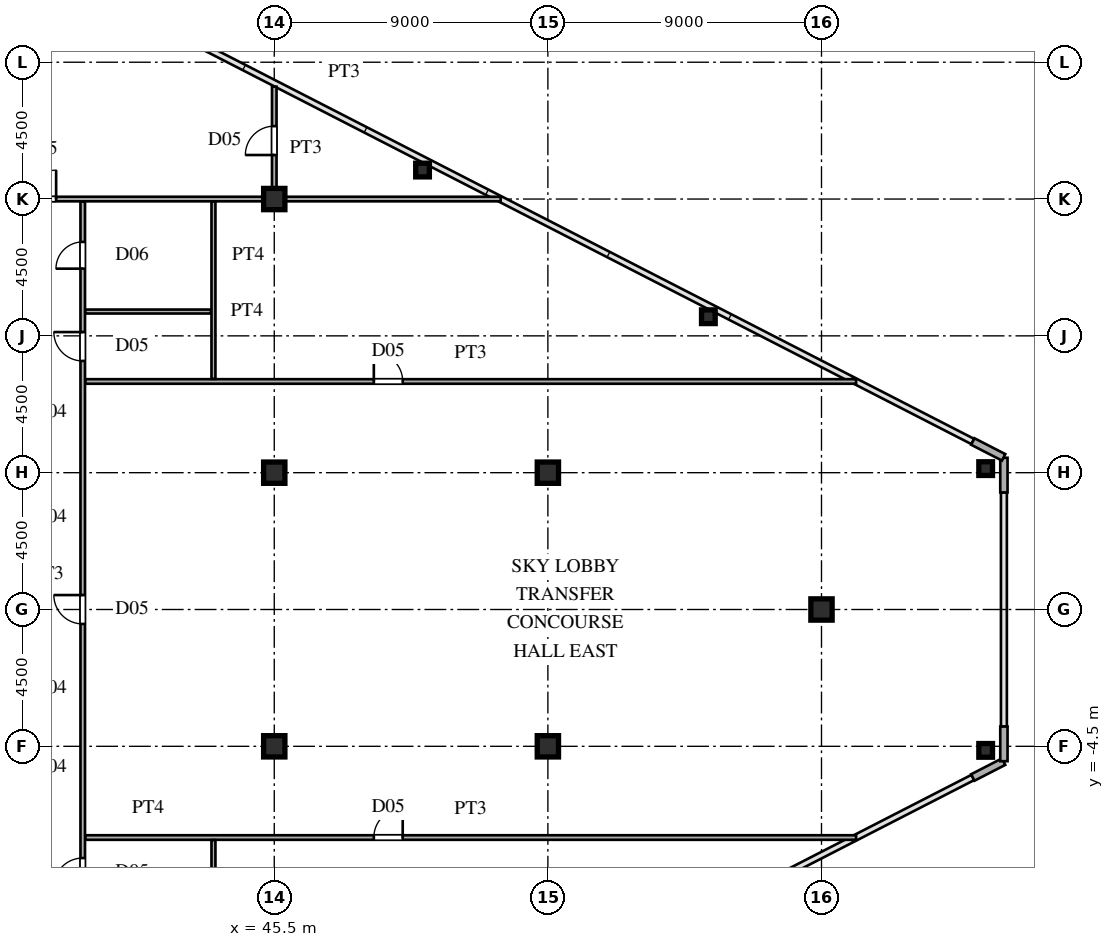
"""IFC4 building model, lengths in metres.
Left out: names, types, materials, properties, quantities, classifications, styles, units other than length and angle.
Written with IfcOpenShell. Run it as: python <this file> out.ifc"""

import sys

from ifc_helpers import new_model, si_unit, direction, frame, frame_2d, origin, origin_2d, place, context, subcontext, project, spatial, rectangle, hollow_rectangle, i_section, extrude, source, transform, mapped, element, fill, save


model = new_model("IFC4")
c1 = context("Model", 3, precision=1e-05, world=origin(), true_north=direction((0.0, 1.0)))
c2 = subcontext(c1, "Body", "Model", "MODEL_VIEW")
j1 = project(units=[si_unit("LENGTHUNIT", "METRE"), si_unit("PLANEANGLEUNIT", "RADIAN")], contexts=[c1])
p1 = place(None, origin())
s1 = spatial("IfcSite", under=j1, at=p1, CompositionType="ELEMENT")
p2 = place(p1, origin())
s2 = spatial("IfcBuilding", under=s1, at=p2, CompositionType="ELEMENT")
p3 = place(p2, frame((0.0, 0.0, 135.6)))
s3 = spatial("IfcBuildingStorey", under=s2, at=p3, CompositionType="ELEMENT", Elevation=135.6)
m1 = source(origin(), c2, "Body", "SweptSolid", [
    extrude(i_section(OverallWidth=0.7, OverallDepth=0.7, WebThickness=0.028, FlangeThickness=0.045, at=origin_2d()), origin(), (0.0, 0.0, 1.0), 4.8),
])
for number, where, z_axis, x_axis in (
    (1, (45.5, -4.5, 0.0), (0.0, 0.0, 1.0), (1.0, 0.0, 0.0)),
    (2, (45.5, 4.5, 0.0), (0.0, 0.0, 1.0), (1.0, 0.0, 0.0)),
    (3, (45.5, 13.5, 0.0), (0.0, 0.0, 1.0), (1.0, 0.0, 0.0)),
    (4, (54.5, -4.5, 0.0), (0.0, 0.0, 1.0), (1.0, 0.0, 0.0)),
    (5, (54.5, 4.5, 0.0), (0.0, 0.0, 1.0), (1.0, 0.0, 0.0)),
    (6, (63.5, 0.0, 0.0), (0.0, 0.0, 1.0), (1.0, 0.0, 0.0)),
):
    element("IfcColumn", number, at=place(p3, frame(where, z_axis=z_axis, x_axis=x_axis)), inside=s3, PredefinedType="COLUMN", context=c2, shape_type="MappedRepresentation", body=[
        mapped(m1, transform((0.0, 0.0, 0.0), scale=1.0)),
    ])
m2 = source(origin(), c2, "Body", "SweptSolid", [
    extrude(hollow_rectangle(XDim=0.45, YDim=0.45, WallThickness=0.018, at=origin_2d()), origin(), (0.0, 0.0, 1.0), 4.8),
])
for number, where, z_axis, x_axis in (
    (7, (68.9, -4.634, 0.0), (0.0, 0.0, 1.0), (1.0, 0.0, 0.0)),
    (8, (68.9, 4.634, 0.0), (0.0, 0.0, 1.0), (1.0, 0.0, 0.0)),
    (9, (50.377, 14.453, 0.0), (0.0, 0.0, 1.0), (1.0, 0.0, 0.0)),
    (10, (59.779, 9.629, 0.0), (0.0, 0.0, 1.0), (1.0, 0.0, 0.0)),
):
    element("IfcColumn", number, at=place(p3, frame(where, z_axis=z_axis, x_axis=x_axis)), inside=s3, PredefinedType="COLUMN", context=c2, shape_type="MappedRepresentation", body=[
        mapped(m2, transform((0.0, 0.0, 0.0), scale=1.0)),
    ])
p4 = place(p3, frame((68.477, -5.525, 0.0), z_axis=(0.0, 0.0, 1.0), x_axis=(0.889797395748, 0.456355776255, 0.0)))
e11 = element("IfcWall", 11, at=p4, inside=s3, PredefinedType="SOLIDWALL", context=c2, shape_type="SweptSolid", body=[
    extrude(rectangle(XDim=1.14, YDim=0.24, at=frame_2d((0.57, 0.0))), origin(), (0.0, 0.0, 1.0), 4.58),
])
for number, where, z_axis, x_axis in (
    (12, (69.5, -4.99, 0.0), (0.0, 0.0, 1.0), (0.0, 1.0, 0.0)),
    (13, (69.5, 3.85, 0.0), (0.0, 0.0, 1.0), (0.0, 1.0, 0.0)),
):
    element("IfcWall", number, at=place(p3, frame(where, z_axis=z_axis, x_axis=x_axis)), inside=s3, PredefinedType="SOLIDWALL", context=c2, shape_type="SweptSolid", body=[
        extrude(rectangle(XDim=1.14, YDim=0.24, at=frame_2d((0.57, 0.0))), origin(), (0.0, 0.0, 1.0), 4.58),
    ])
p5 = place(p3, frame((69.491, 5.005, 0.0), z_axis=(0.0, 0.0, 1.0), x_axis=(-0.889797395748, 0.456355776255, 0.0)))
e14 = element("IfcWall", 14, at=p5, inside=s3, PredefinedType="SOLIDWALL", context=c2, shape_type="SweptSolid", body=[
    extrude(rectangle(XDim=1.14, YDim=0.24, at=frame_2d((0.57, 0.0))), origin(), (0.0, 0.0, 1.0), 4.58),
])
p6 = place(p3, frame((39.285, -7.5, 0.0), z_axis=(0.0, 0.0, 1.0), x_axis=(1.0, 0.0, 0.0)))
e15 = element("IfcWall", 15, at=p6, inside=s3, PredefinedType="PARTITIONING", context=c2, shape_type="SweptSolid", body=[
    extrude(rectangle(XDim=25.354, YDim=0.15, at=frame_2d((12.677, 0.0))), origin(), (0.0, 0.0, 1.0), 4.58),
])
p7 = place(p6, frame((9.49, 0.0, 0.0)))
e16 = element("IfcOpeningElement", 16, at=p7, cuts=e15, PredefinedType="OPENING", context=c2, shape_type="SweptSolid", body=[
    extrude(rectangle(XDim=0.95, YDim=2.15, at=frame_2d((0.475, 1.075))), frame((0.0, 0.085, 0.0), z_axis=(0.0, -1.0, 0.0), x_axis=(1.0, 0.0, 0.0)), (0.0, 0.0, 1.0), 0.17),
])
p8 = place(p3, frame((39.285, 7.5, 0.0), z_axis=(0.0, 0.0, 1.0), x_axis=(1.0, 0.0, 0.0)))
e17 = element("IfcWall", 17, at=p8, inside=s3, PredefinedType="PARTITIONING", context=c2, shape_type="SweptSolid", body=[
    extrude(rectangle(XDim=25.354, YDim=0.15, at=frame_2d((12.677, 0.0))), origin(), (0.0, 0.0, 1.0), 4.58),
])
p9 = place(p8, frame((9.49, 0.0, 0.0)))
e18 = element("IfcOpeningElement", 18, at=p9, cuts=e17, PredefinedType="OPENING", context=c2, shape_type="SweptSolid", body=[
    extrude(rectangle(XDim=0.95, YDim=2.15, at=frame_2d((0.475, 1.075))), frame((0.0, 0.085, 0.0), z_axis=(0.0, -1.0, 0.0), x_axis=(1.0, 0.0, 0.0)), (0.0, 0.0, 1.0), 0.17),
])
p10 = place(p3, frame((39.285, 9.8, 0.0), z_axis=(0.0, 0.0, 1.0), x_axis=(1.0, 0.0, 0.0)))
e19 = element("IfcWall", 19, at=p10, inside=s3, PredefinedType="PARTITIONING", context=c2, shape_type="SweptSolid", body=[
    extrude(rectangle(XDim=4.13, YDim=0.13, at=frame_2d((2.065, 0.0))), origin(), (0.0, 0.0, 1.0), 4.58),
])
p11 = place(p3, frame((36.78, 13.5, 0.0), z_axis=(0.0, 0.0, 1.0), x_axis=(1.0, 0.0, 0.0)))
e20 = element("IfcWall", 20, at=p11, inside=s3, PredefinedType="PARTITIONING", context=c2, shape_type="SweptSolid", body=[
    extrude(rectangle(XDim=16.167, YDim=0.15, at=frame_2d((8.083, 0.0))), origin(), (0.0, 0.0, 1.0), 3.98),
])
p12 = place(p11, frame((0.595, 0.0, 0.0)))
e21 = element("IfcOpeningElement", 21, at=p12, cuts=e20, PredefinedType="OPENING", context=c2, shape_type="SweptSolid", body=[
    extrude(rectangle(XDim=0.95, YDim=2.15, at=frame_2d((0.475, 1.075))), frame((0.0, 0.085, 0.0), z_axis=(0.0, -1.0, 0.0), x_axis=(1.0, 0.0, 0.0)), (0.0, 0.0, 1.0), 0.17),
])
p13 = place(p3, frame((39.2, -13.415, 0.0), z_axis=(0.0, 0.0, 1.0), x_axis=(0.0, 1.0, 0.0)))
e22 = element("IfcWall", 22, at=p13, inside=s3, PredefinedType="PARTITIONING", context=c2, shape_type="SweptSolid", body=[
    extrude(rectangle(XDim=26.83, YDim=0.15, at=frame_2d((13.415, 0.0))), origin(), (0.0, 0.0, 1.0), 4.58),
])
p14 = place(p13, frame((12.94, 0.0, 0.0)))
e23 = element("IfcOpeningElement", 23, at=p14, cuts=e22, PredefinedType="OPENING", context=c2, shape_type="SweptSolid", body=[
    extrude(rectangle(XDim=0.95, YDim=2.15, at=frame_2d((0.475, 1.075))), frame((0.0, 0.085, 0.0), z_axis=(0.0, -1.0, 0.0), x_axis=(1.0, 0.0, 0.0)), (0.0, 0.0, 1.0), 0.17),
])
p15 = place(p13, frame((1.325, 0.0, 0.0)))
e24 = element("IfcOpeningElement", 24, at=p15, cuts=e22, PredefinedType="OPENING", context=c2, shape_type="SweptSolid", body=[
    extrude(rectangle(XDim=0.88, YDim=2.1, at=frame_2d((0.44, 1.05))), frame((0.0, 0.085, 0.0), z_axis=(0.0, -1.0, 0.0), x_axis=(1.0, 0.0, 0.0)), (0.0, 0.0, 1.0), 0.17),
])
p16 = place(p13, frame((4.29, 0.0, 0.0)))
e25 = element("IfcOpeningElement", 25, at=p16, cuts=e22, PredefinedType="OPENING", context=c2, shape_type="SweptSolid", body=[
    extrude(rectangle(XDim=0.95, YDim=2.15, at=frame_2d((0.475, 1.075))), frame((0.0, 0.085, 0.0), z_axis=(0.0, -1.0, 0.0), x_axis=(1.0, 0.0, 0.0)), (0.0, 0.0, 1.0), 0.17),
])
p17 = place(p13, frame((21.59, 0.0, 0.0)))
e26 = element("IfcOpeningElement", 26, at=p17, cuts=e22, PredefinedType="OPENING", context=c2, shape_type="SweptSolid", body=[
    extrude(rectangle(XDim=0.95, YDim=2.15, at=frame_2d((0.475, 1.075))), frame((0.0, 0.085, 0.0), z_axis=(0.0, -1.0, 0.0), x_axis=(1.0, 0.0, 0.0)), (0.0, 0.0, 1.0), 0.17),
])
p18 = place(p13, frame((24.625, 0.0, 0.0)))
e27 = element("IfcOpeningElement", 27, at=p18, cuts=e22, PredefinedType="OPENING", context=c2, shape_type="SweptSolid", body=[
    extrude(rectangle(XDim=0.88, YDim=2.1, at=frame_2d((0.44, 1.05))), frame((0.0, 0.085, 0.0), z_axis=(0.0, -1.0, 0.0), x_axis=(1.0, 0.0, 0.0)), (0.0, 0.0, 1.0), 0.17),
])
for number, where, z_axis, x_axis in (
    (28, (43.5, -13.415, 0.0), (0.0, 0.0, 1.0), (0.0, 1.0, 0.0)),
    (29, (43.5, 7.585, 0.0), (0.0, 0.0, 1.0), (0.0, 1.0, 0.0)),
):
    element("IfcWall", number, at=place(p3, frame(where, z_axis=z_axis, x_axis=x_axis)), inside=s3, PredefinedType="PARTITIONING", context=c2, shape_type="SweptSolid", body=[
        extrude(rectangle(XDim=5.83, YDim=0.13, at=frame_2d((2.915, 0.0))), origin(), (0.0, 0.0, 1.0), 4.58),
    ])
p19 = place(p3, frame((45.5, 13.585, 0.0), z_axis=(0.0, 0.0, 1.0), x_axis=(0.0, 1.0, 0.0)))
e30 = element("IfcWall", 30, at=p19, inside=s3, PredefinedType="PARTITIONING", context=c2, shape_type="SweptSolid", body=[
    extrude(rectangle(XDim=3.611, YDim=0.15, at=frame_2d((1.806, 0.0))), origin(), (0.0, 0.0, 1.0), 4.58),
])
p20 = place(p19, frame((1.363, 0.0, 0.0)))
e31 = element("IfcOpeningElement", 31, at=p20, cuts=e30, PredefinedType="OPENING", context=c2, shape_type="SweptSolid", body=[
    extrude(rectangle(XDim=0.95, YDim=2.15, at=frame_2d((0.475, 1.075))), frame((0.0, 0.085, 0.0), z_axis=(0.0, -1.0, 0.0), x_axis=(1.0, 0.0, 0.0)), (0.0, 0.0, 1.0), 0.17),
])
m3 = source(origin(), c2, "Body", "SweptSolid", [
    extrude(rectangle(XDim=0.95, YDim=2.15, at=frame_2d((0.475, 1.075))), frame((0.0, 0.025, 0.0), z_axis=(0.0, -1.0, 0.0), x_axis=(1.0, 0.0, 0.0)), (0.0, 0.0, 1.0), 0.05),
])
p21 = place(p7, origin())
e32 = element("IfcDoor", 32, at=p21, inside=s3, OperationType="SINGLE_SWING_RIGHT", PredefinedType="DOOR", context=c2, shape_type="MappedRepresentation", body=[
    mapped(m3, transform((0.0, 0.0, 0.0), scale=1.0)),
])
fill(e16, e32)
p22 = place(p9, origin())
e33 = element("IfcDoor", 33, at=p22, inside=s3, OperationType="SINGLE_SWING_LEFT", PredefinedType="DOOR", context=c2, shape_type="MappedRepresentation", body=[
    mapped(m3, transform((0.0, 0.0, 0.0), scale=1.0)),
])
fill(e18, e33)
p23 = place(p12, origin())
e34 = element("IfcDoor", 34, at=p23, inside=s3, OperationType="SINGLE_SWING_RIGHT", PredefinedType="DOOR", context=c2, shape_type="MappedRepresentation", body=[
    mapped(m3, transform((0.0, 0.0, 0.0), scale=1.0)),
])
fill(e21, e34)
p24 = place(p14, origin())
e35 = element("IfcDoor", 35, at=p24, inside=s3, OperationType="SINGLE_SWING_RIGHT", PredefinedType="DOOR", context=c2, shape_type="MappedRepresentation", body=[
    mapped(m3, transform((0.0, 0.0, 0.0), scale=1.0)),
])
fill(e23, e35)
p25 = place(p16, origin())
e36 = element("IfcDoor", 36, at=p25, inside=s3, OperationType="SINGLE_SWING_LEFT", PredefinedType="DOOR", context=c2, shape_type="MappedRepresentation", body=[
    mapped(m3, transform((0.0, 0.0, 0.0), scale=1.0)),
])
fill(e25, e36)
p26 = place(p17, origin())
e37 = element("IfcDoor", 37, at=p26, inside=s3, OperationType="SINGLE_SWING_RIGHT", PredefinedType="DOOR", context=c2, shape_type="MappedRepresentation", body=[
    mapped(m3, transform((0.0, 0.0, 0.0), scale=1.0)),
])
fill(e26, e37)
m4 = source(origin(), c2, "Body", "SweptSolid", [
    extrude(rectangle(XDim=0.88, YDim=2.1, at=frame_2d((0.44, 1.05))), frame((0.0, 0.025, 0.0), z_axis=(0.0, -1.0, 0.0), x_axis=(1.0, 0.0, 0.0)), (0.0, 0.0, 1.0), 0.05),
])
p27 = place(p18, origin())
e38 = element("IfcDoor", 38, at=p27, inside=s3, OperationType="SINGLE_SWING_LEFT", PredefinedType="DOOR", context=c2, shape_type="MappedRepresentation", body=[
    mapped(m4, transform((0.0, 0.0, 0.0), scale=1.0)),
])
fill(e27, e38)
p28 = place(p20, origin())
e39 = element("IfcDoor", 39, at=p28, inside=s3, OperationType="SINGLE_SWING_LEFT", PredefinedType="DOOR", context=c2, shape_type="MappedRepresentation", body=[
    mapped(m3, transform((0.0, 0.0, 0.0), scale=1.0)),
])
fill(e31, e39)
save(model, sys.argv[1])
